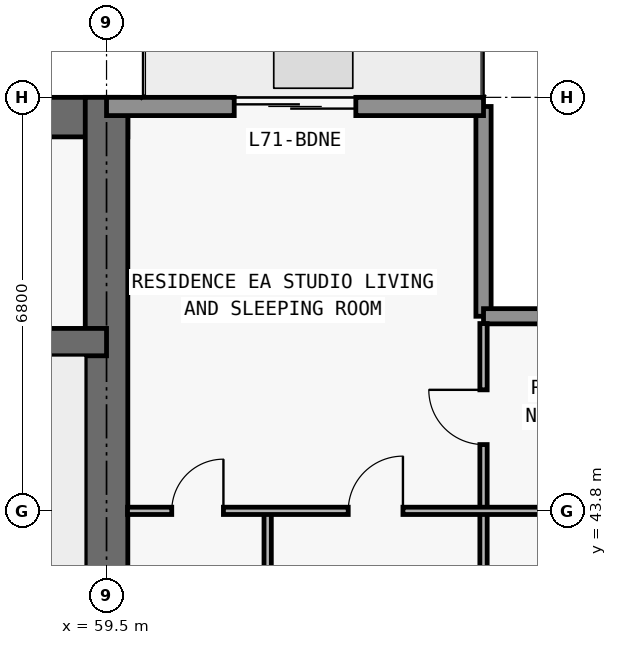
"""IFC4 building model, lengths in metres.
Left out: names, types, materials, properties, quantities, classifications, styles, units other than length and angle.
Written with IfcOpenShell. Run it as: python <this file> out.ifc"""

import sys

from ifc_helpers import new_model, si_unit, direction, frame, frame_2d, origin, place, context, subcontext, project, spatial, rectangle, extrude, element, fill, save


model = new_model("IFC4")
c1 = context("Model", 3, precision=1e-05, world=origin(), true_north=direction((0.0, 1.0)))
c2 = subcontext(c1, "Body", "Model", "MODEL_VIEW")
j1 = project(units=[si_unit("LENGTHUNIT", "METRE"), si_unit("PLANEANGLEUNIT", "RADIAN")], contexts=[c1])
p1 = place(None, origin())
s1 = spatial("IfcSite", under=j1, at=p1, CompositionType="ELEMENT")
p2 = place(p1, origin())
s2 = spatial("IfcBuilding", under=s1, at=p2, CompositionType="ELEMENT")
p3 = place(p2, frame((0.0, 0.0, 252.9)))
s3 = spatial("IfcBuildingStorey", under=s2, at=p3, CompositionType="ELEMENT", Elevation=252.9)
p4 = place(p3, frame((17.95, 50.275, 0.0), z_axis=(0.0, 0.0, 1.0), x_axis=(1.0, 0.0, 0.0)))
e1 = element("IfcWall", 1, at=p4, inside=s3, PredefinedType="SHEAR", context=c2, shape_type="SweptSolid", body=[
    extrude(rectangle(XDim=41.9, YDim=0.65, at=frame_2d((20.95, 0.0))), origin(), (0.0, 0.0, 1.0), 3.05),
])
p5 = place(p3, frame((59.5, 36.65, 0.0), z_axis=(0.0, 0.0, 1.0), x_axis=(0.0, 1.0, 0.0)))
e2 = element("IfcWall", 2, at=p5, inside=s3, PredefinedType="SHEAR", context=c2, shape_type="SweptSolid", body=[
    extrude(rectangle(XDim=13.95, YDim=0.7, at=frame_2d((6.975, 0.0))), origin(), (0.0, 0.0, 1.0), 3.05),
])
p6 = place(p3, frame((18.3, 46.575, 0.0), z_axis=(0.0, 0.0, 1.0), x_axis=(1.0, 0.0, 0.0)))
e3 = element("IfcWall", 3, at=p6, inside=s3, PredefinedType="SHEAR", context=c2, shape_type="SweptSolid", body=[
    extrude(rectangle(XDim=41.2, YDim=0.45, at=frame_2d((20.6, 0.0))), origin(), (0.0, 0.0, 1.0), 3.05),
])
p7 = place(p6, frame((7.575, 0.0, 0.0)))
e4 = element("IfcOpeningElement", 4, at=p7, cuts=e3, PredefinedType="OPENING", context=c2, shape_type="SweptSolid", body=[
    extrude(rectangle(XDim=1.05, YDim=2.15, at=frame_2d((0.525, 1.075))), frame((0.0, 0.235, 0.0), z_axis=(0.0, -1.0, 0.0), x_axis=(1.0, 0.0, 0.0)), (0.0, 0.0, 1.0), 0.47),
])
p8 = place(p6, frame((32.625, 0.0, 0.0)))
e5 = element("IfcOpeningElement", 5, at=p8, cuts=e3, PredefinedType="OPENING", context=c2, shape_type="SweptSolid", body=[
    extrude(rectangle(XDim=1.05, YDim=2.15, at=frame_2d((0.525, 1.075))), frame((0.0, 0.235, 0.0), z_axis=(0.0, -1.0, 0.0), x_axis=(1.0, 0.0, 0.0)), (0.0, 0.0, 1.0), 0.47),
])
p9 = place(p3, frame((65.7, 50.45, 0.0), z_axis=(0.0, 0.0, 1.0), x_axis=(0.0, -1.0, 0.0)))
e6 = element("IfcWall", 6, at=p9, inside=s3, PredefinedType="ELEMENTEDWALL", context=c2, shape_type="SweptSolid", body=[
    extrude(rectangle(XDim=3.45, YDim=0.25, at=frame_2d((1.725, 0.0))), origin(), (0.0, 0.0, 1.0), 3.05),
])
p10 = place(p3, frame((65.7, 47.0, 0.0), z_axis=(0.0, 0.0, 1.0), x_axis=(1.0, 0.0, 0.0)))
e7 = element("IfcWall", 7, at=p10, inside=s3, PredefinedType="ELEMENTEDWALL", context=c2, shape_type="SweptSolid", body=[
    extrude(rectangle(XDim=3.85, YDim=0.25, at=frame_2d((1.925, 0.0))), origin(), (0.0, 0.0, 1.0), 3.05),
])
p11 = place(p3, frame((59.5, 50.45, 0.0), z_axis=(0.0, 0.0, 1.0), x_axis=(1.0, 0.0, 0.0)))
e8 = element("IfcWall", 8, at=p11, inside=s3, PredefinedType="STANDARD", context=c2, shape_type="SweptSolid", body=[
    extrude(rectangle(XDim=6.2, YDim=0.3, at=frame_2d((3.1, 0.0))), origin(), (0.0, 0.0, 1.0), 3.05),
])
p12 = place(p11, frame((2.1, 0.0, 0.0)))
e9 = element("IfcOpeningElement", 9, at=p12, cuts=e8, PredefinedType="OPENING", context=c2, shape_type="SweptSolid", body=[
    extrude(rectangle(XDim=2.0, YDim=2.3, at=frame_2d((1.0, 1.15))), frame((0.0, 0.16, 0.0), z_axis=(0.0, -1.0, 0.0), x_axis=(1.0, 0.0, 0.0)), (0.0, 0.0, 1.0), 0.32),
])
p13 = place(p3, frame((62.15, 37.0, 0.0), z_axis=(0.0, 0.0, 1.0), x_axis=(0.0, 1.0, 0.0)))
e10 = element("IfcWall", 10, at=p13, inside=s3, PredefinedType="PARTITIONING", context=c2, shape_type="SweptSolid", body=[
    extrude(rectangle(XDim=6.8, YDim=0.12, at=frame_2d((3.4, 0.0))), origin(), (0.0, 0.0, 1.0), 3.05),
])
p14 = place(p13, frame((1.207, 0.0, 0.0)))
e11 = element("IfcOpeningElement", 11, at=p14, cuts=e10, PredefinedType="OPENING", context=c2, shape_type="SweptSolid", body=[
    extrude(rectangle(XDim=0.85, YDim=2.1, at=frame_2d((0.425, 1.05))), frame((0.0, 0.07, 0.0), z_axis=(0.0, -1.0, 0.0), x_axis=(1.0, 0.0, 0.0)), (0.0, 0.0, 1.0), 0.14),
])
p15 = place(p3, frame((65.7, 37.005, 0.0), z_axis=(0.0, 0.0, 1.0), x_axis=(0.0, 1.0, 0.0)))
e12 = element("IfcWall", 12, at=p15, inside=s3, PredefinedType="PARTITIONING", context=c2, shape_type="SweptSolid", body=[
    extrude(rectangle(XDim=9.875, YDim=0.12, at=frame_2d((4.938, 0.0))), origin(), (0.0, 0.0, 1.0), 3.05),
])
p16 = place(p15, frame((2.948, 0.0, 0.0)))
e13 = element("IfcOpeningElement", 13, at=p16, cuts=e12, PredefinedType="OPENING", context=c2, shape_type="SweptSolid", body=[
    extrude(rectangle(XDim=0.9, YDim=2.15, at=frame_2d((0.45, 1.075))), frame((0.0, 0.07, 0.0), z_axis=(0.0, -1.0, 0.0), x_axis=(1.0, 0.0, 0.0)), (0.0, 0.0, 1.0), 0.14),
])
p17 = place(p15, frame((7.885, 0.0, 0.0)))
e14 = element("IfcOpeningElement", 14, at=p17, cuts=e12, PredefinedType="OPENING", context=c2, shape_type="SweptSolid", body=[
    extrude(rectangle(XDim=0.9, YDim=2.15, at=frame_2d((0.45, 1.075))), frame((0.0, 0.07, 0.0), z_axis=(0.0, -1.0, 0.0), x_axis=(1.0, 0.0, 0.0)), (0.0, 0.0, 1.0), 0.14),
])
p18 = place(p3, frame((59.845, 43.8, 0.0), z_axis=(0.0, 0.0, 1.0), x_axis=(1.0, 0.0, 0.0)))
e15 = element("IfcWall", 15, at=p18, inside=s3, PredefinedType="PARTITIONING", context=c2, shape_type="SweptSolid", body=[
    extrude(rectangle(XDim=9.56, YDim=0.12, at=frame_2d((4.78, 0.0))), origin(), (0.0, 0.0, 1.0), 2.418),
])
p19 = place(p18, frame((3.63, 0.0, 0.0)))
e16 = element("IfcOpeningElement", 16, at=p19, cuts=e15, PredefinedType="OPENING", context=c2, shape_type="SweptSolid", body=[
    extrude(rectangle(XDim=0.9, YDim=2.15, at=frame_2d((0.45, 1.075))), frame((0.0, 0.07, 0.0), z_axis=(0.0, -1.0, 0.0), x_axis=(1.0, 0.0, 0.0)), (0.0, 0.0, 1.0), 0.14),
])
p20 = place(p18, frame((0.728, 0.0, 0.0)))
e17 = element("IfcOpeningElement", 17, at=p20, cuts=e15, PredefinedType="OPENING", context=c2, shape_type="SweptSolid", body=[
    extrude(rectangle(XDim=0.85, YDim=2.1, at=frame_2d((0.425, 1.05))), frame((0.0, 0.07, 0.0), z_axis=(0.0, -1.0, 0.0), x_axis=(1.0, 0.0, 0.0)), (0.0, 0.0, 1.0), 0.14),
])
p21 = place(p12, origin())
e18 = element("IfcDoor", 18, at=p21, inside=s3, OperationType="DOUBLE_DOOR_SLIDING", PredefinedType="DOOR", context=c2, shape_type="SweptSolid", body=[
    extrude(rectangle(XDim=2.0, YDim=2.3, at=frame_2d((1.0, 1.15))), frame((0.0, 0.025, 0.0), z_axis=(0.0, -1.0, 0.0), x_axis=(1.0, 0.0, 0.0)), (0.0, 0.0, 1.0), 0.05),
])
fill(e9, e18)
p22 = place(p19, origin())
e19 = element("IfcDoor", 19, at=p22, inside=s3, OperationType="SINGLE_SWING_RIGHT", PredefinedType="DOOR", context=c2, shape_type="SweptSolid", body=[
    extrude(rectangle(XDim=0.9, YDim=2.15, at=frame_2d((0.45, 1.075))), frame((0.0, 0.025, 0.0), z_axis=(0.0, -1.0, 0.0), x_axis=(1.0, 0.0, 0.0)), (0.0, 0.0, 1.0), 0.05),
])
fill(e16, e19)
p23 = place(p20, origin())
e20 = element("IfcDoor", 20, at=p23, inside=s3, OperationType="SINGLE_SWING_RIGHT", PredefinedType="DOOR", context=c2, shape_type="SweptSolid", body=[
    extrude(rectangle(XDim=0.85, YDim=2.1, at=frame_2d((0.425, 1.05))), frame((0.0, 0.025, 0.0), z_axis=(0.0, -1.0, 0.0), x_axis=(1.0, 0.0, 0.0)), (0.0, 0.0, 1.0), 0.05),
])
fill(e17, e20)
p24 = place(p17, origin())
e21 = element("IfcDoor", 21, at=p24, inside=s3, OperationType="SINGLE_SWING_RIGHT", PredefinedType="DOOR", context=c2, shape_type="SweptSolid", body=[
    extrude(rectangle(XDim=0.9, YDim=2.15, at=frame_2d((0.45, 1.075))), frame((0.0, 0.025, 0.0), z_axis=(0.0, -1.0, 0.0), x_axis=(1.0, 0.0, 0.0)), (0.0, 0.0, 1.0), 0.05),
])
fill(e14, e21)
save(model, sys.argv[1])
